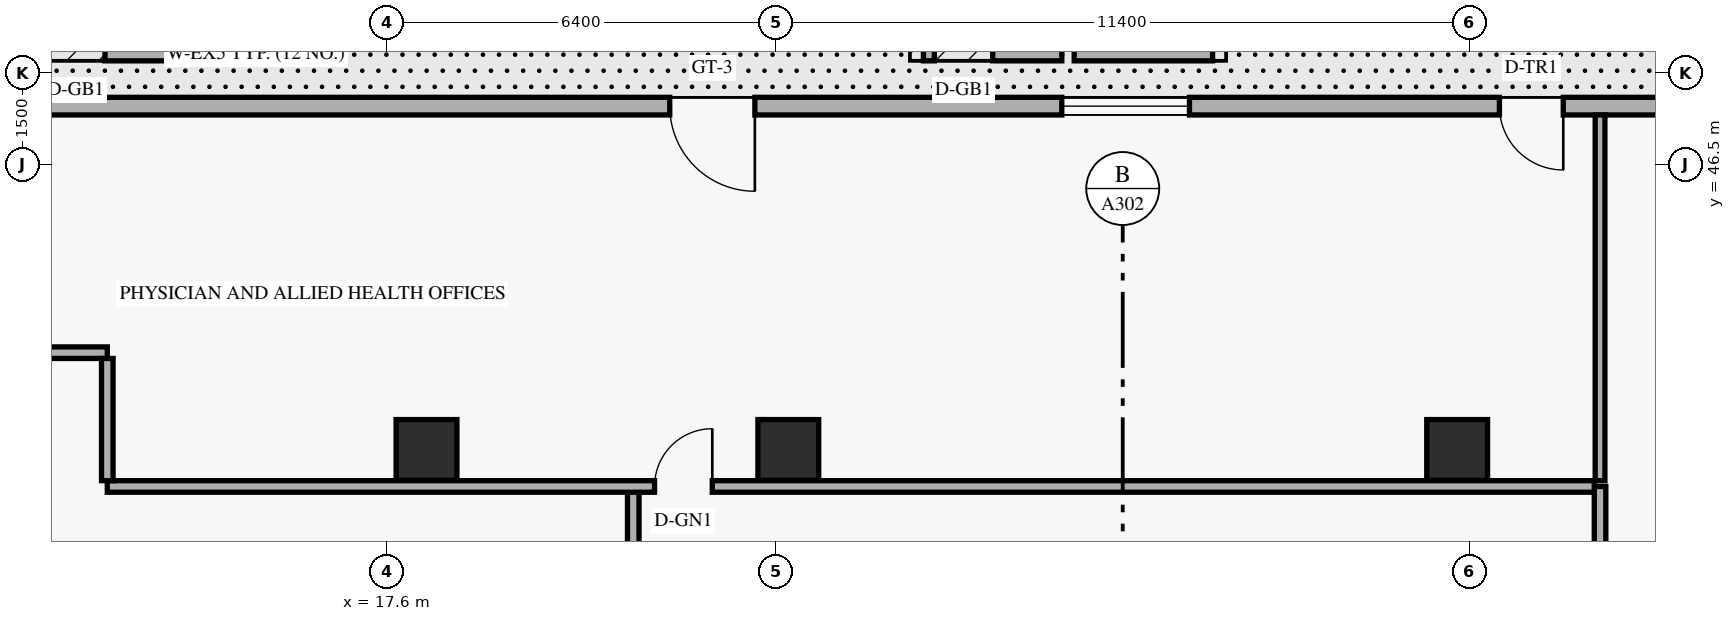
"""IFC4 building model, lengths in metres.
Left out: names, types, materials, properties, quantities, classifications, styles, units other than length and angle.
Written with IfcOpenShell. Run it as: python <this file> out.ifc"""

import sys

from ifc_helpers import new_model, si_unit, direction, frame, frame_2d, origin, origin_2d, place, context, subcontext, project, spatial, rectangle, extrude, element, fill, save


model = new_model("IFC4")
c1 = context("Model", 3, precision=1e-05, world=origin(), true_north=direction((0.0, 1.0)))
c2 = subcontext(c1, "Body", "Model", "MODEL_VIEW")
j1 = project(units=[si_unit("LENGTHUNIT", "METRE"), si_unit("PLANEANGLEUNIT", "RADIAN")], contexts=[c1])
p1 = place(None, origin())
s1 = spatial("IfcSite", under=j1, at=p1, CompositionType="ELEMENT")
p2 = place(p1, origin())
s2 = spatial("IfcBuilding", under=s1, at=p2, CompositionType="ELEMENT")
p3 = place(p2, frame((0.0, 0.0, 4.8)))
s3 = spatial("IfcBuildingStorey", under=s2, at=p3, CompositionType="ELEMENT", Elevation=4.8)
for number, where, z_axis, x_axis in (
    (1, (18.25, 41.8, 0.0), (0.0, 0.0, 1.0), (1.0, 0.0, 0.0)),
    (2, (24.2, 41.8, 0.0), (0.0, 0.0, 1.0), (1.0, 0.0, 0.0)),
    (3, (35.2, 41.8, 0.0), (0.0, 0.0, 1.0), (1.0, 0.0, 0.0)),
):
    element("IfcColumn", number, at=place(p3, frame(where, z_axis=z_axis, x_axis=x_axis)), inside=s3, PredefinedType="COLUMN", context=c2, shape_type="SweptSolid", body=[
        extrude(rectangle(XDim=1.0, YDim=1.0, at=origin_2d()), origin(), (0.0, 0.0, 1.0), 4.8),
    ])
p4 = place(p3, frame((50.78, 47.455, 0.0), z_axis=(0.0, 0.0, 1.0), x_axis=(-1.0, 0.0, 0.0)))
e4 = element("IfcWall", 4, at=p4, inside=s3, PredefinedType="SOLIDWALL", context=c2, shape_type="SweptSolid", body=[
    extrude(rectangle(XDim=46.36, YDim=0.29, at=frame_2d((23.18, 0.0))), origin(), (0.0, 0.0, 1.0), 4.52),
])
p5 = place(p4, frame((13.835, 0.0, 0.0)))
e5 = element("IfcOpeningElement", 5, at=p5, cuts=e4, PredefinedType="OPENING", context=c2, shape_type="SweptSolid", body=[
    extrude(rectangle(XDim=1.05, YDim=2.15, at=frame_2d((0.525, 1.075))), frame((0.0, 0.155, 0.0), z_axis=(0.0, -1.0, 0.0), x_axis=(1.0, 0.0, 0.0)), (0.0, 0.0, 1.0), 0.31),
])
p6 = place(p4, frame((27.13, 0.0, 0.0)))
e6 = element("IfcOpeningElement", 6, at=p6, cuts=e4, PredefinedType="OPENING", context=c2, shape_type="SweptSolid", body=[
    extrude(rectangle(XDim=1.4, YDim=2.15, at=frame_2d((0.7, 1.075))), frame((0.0, 0.155, 0.0), z_axis=(0.0, -1.0, 0.0), x_axis=(1.0, 0.0, 0.0)), (0.0, 0.0, 1.0), 0.31),
])
p7 = place(p4, frame((41.945, 0.0, 0.85)))
e7 = element("IfcOpeningElement", 7, at=p7, cuts=e4, PredefinedType="OPENING", context=c2, shape_type="SweptSolid", body=[
    extrude(rectangle(XDim=2.1, YDim=1.75, at=frame_2d((1.05, 0.875))), frame((0.0, 0.155, 0.0), z_axis=(0.0, -1.0, 0.0), x_axis=(1.0, 0.0, 0.0)), (0.0, 0.0, 1.0), 0.31),
])
p8 = place(p4, frame((19.982, 0.0, 0.85)))
e8 = element("IfcOpeningElement", 8, at=p8, cuts=e4, PredefinedType="OPENING", context=c2, shape_type="SweptSolid", body=[
    extrude(rectangle(XDim=2.1, YDim=1.75, at=frame_2d((1.05, 0.875))), frame((0.0, 0.155, 0.0), z_axis=(0.0, -1.0, 0.0), x_axis=(1.0, 0.0, 0.0)), (0.0, 0.0, 1.0), 0.31),
])
p9 = place(p4, frame((5.565, 0.0, 0.85)))
e9 = element("IfcOpeningElement", 9, at=p9, cuts=e4, PredefinedType="OPENING", context=c2, shape_type="SweptSolid", body=[
    extrude(rectangle(XDim=2.1, YDim=1.75, at=frame_2d((1.05, 0.875))), frame((0.0, 0.155, 0.0), z_axis=(0.0, -1.0, 0.0), x_axis=(1.0, 0.0, 0.0)), (0.0, 0.0, 1.0), 0.31),
])
p10 = place(p3, frame((11.822, 48.315, 0.0), z_axis=(0.0, 0.0, 1.0), x_axis=(1.0, 0.0, 0.0)))
e10 = element("IfcWall", 10, at=p10, inside=s3, PredefinedType="SOLIDWALL", context=c2, shape_type="SweptSolid", body=[
    extrude(rectangle(XDim=2.276, YDim=0.23, at=frame_2d((1.138, 0.0))), origin(), (0.0, 0.0, 1.0), 2.287),
])
p11 = place(p10, frame((0.18, 0.0, 0.0)))
e11 = element("IfcOpeningElement", 11, at=p11, cuts=e10, PredefinedType="OPENING", context=c2, shape_type="SweptSolid", body=[
    extrude(rectangle(XDim=0.96, YDim=2.08, at=frame_2d((0.48, 1.04))), frame((0.0, 0.125, 0.0), z_axis=(0.0, -1.0, 0.0), x_axis=(1.0, 0.0, 0.0)), (0.0, 0.0, 1.0), 0.25),
])
p12 = place(p3, frame((14.302, 48.315, 0.0), z_axis=(0.0, 0.0, 1.0), x_axis=(1.0, 0.0, 0.0)))
e12 = element("IfcWall", 12, at=p12, inside=s3, PredefinedType="SOLIDWALL", context=c2, shape_type="SweptSolid", body=[
    extrude(rectangle(XDim=2.276, YDim=0.23, at=frame_2d((1.138, 0.0))), origin(), (0.0, 0.0, 1.0), 2.287),
])
p13 = place(p3, frame((26.422, 48.315, 0.0), z_axis=(0.0, 0.0, 1.0), x_axis=(1.0, 0.0, 0.0)))
e13 = element("IfcWall", 13, at=p13, inside=s3, PredefinedType="SOLIDWALL", context=c2, shape_type="SweptSolid", body=[
    extrude(rectangle(XDim=2.276, YDim=0.23, at=frame_2d((1.138, 0.0))), origin(), (0.0, 0.0, 1.0), 2.287),
])
p14 = place(p13, frame((0.18, 0.0, 0.0)))
e14 = element("IfcOpeningElement", 14, at=p14, cuts=e13, PredefinedType="OPENING", context=c2, shape_type="SweptSolid", body=[
    extrude(rectangle(XDim=0.96, YDim=2.08, at=frame_2d((0.48, 1.04))), frame((0.0, 0.125, 0.0), z_axis=(0.0, -1.0, 0.0), x_axis=(1.0, 0.0, 0.0)), (0.0, 0.0, 1.0), 0.25),
])
p15 = place(p3, frame((28.902, 48.315, 0.0), z_axis=(0.0, 0.0, 1.0), x_axis=(1.0, 0.0, 0.0)))
e15 = element("IfcWall", 15, at=p15, inside=s3, PredefinedType="SOLIDWALL", context=c2, shape_type="SweptSolid", body=[
    extrude(rectangle(XDim=2.276, YDim=0.23, at=frame_2d((1.138, 0.0))), origin(), (0.0, 0.0, 1.0), 2.287),
])
p16 = place(p3, frame((21.65, 6.8, 0.0), z_axis=(0.0, 0.0, 1.0), x_axis=(0.0, 1.0, 0.0)))
e16 = element("IfcWall", 16, at=p16, inside=s3, PredefinedType="STANDARD", context=c2, shape_type="SweptSolid", body=[
    extrude(rectangle(XDim=34.4, YDim=0.19, at=frame_2d((17.2, 0.0))), origin(), (0.0, 0.0, 1.0), 3.502),
])
p17 = place(p16, frame((20.2, 0.0, 0.0)))
e17 = element("IfcOpeningElement", 17, at=p17, cuts=e16, PredefinedType="OPENING", context=c2, shape_type="SweptSolid", body=[
    extrude(rectangle(XDim=0.92, YDim=2.14, at=frame_2d((0.46, 1.07))), frame((0.0, 0.105, 0.0), z_axis=(0.0, -1.0, 0.0), x_axis=(1.0, 0.0, 0.0)), (0.0, 0.0, 1.0), 0.21),
])
p18 = place(p16, frame((28.2, 0.0, 0.0)))
e18 = element("IfcOpeningElement", 18, at=p18, cuts=e16, PredefinedType="OPENING", context=c2, shape_type="SweptSolid", body=[
    extrude(rectangle(XDim=0.95, YDim=2.15, at=frame_2d((0.475, 1.075))), frame((0.0, 0.105, 0.0), z_axis=(0.0, -1.0, 0.0), x_axis=(1.0, 0.0, 0.0)), (0.0, 0.0, 1.0), 0.21),
])
p19 = place(p16, frame((6.0, 0.0, 0.0)))
e19 = element("IfcOpeningElement", 19, at=p19, cuts=e16, PredefinedType="OPENING", context=c2, shape_type="SweptSolid", body=[
    extrude(rectangle(XDim=0.9, YDim=2.1, at=frame_2d((0.45, 1.05))), frame((0.0, 0.105, 0.0), z_axis=(0.0, -1.0, 0.0), x_axis=(1.0, 0.0, 0.0)), (0.0, 0.0, 1.0), 0.21),
])
p20 = place(p3, frame((37.55, 6.8, 0.0), z_axis=(0.0, 0.0, 1.0), x_axis=(0.0, 1.0, 0.0)))
e20 = element("IfcWall", 20, at=p20, inside=s3, PredefinedType="STANDARD", context=c2, shape_type="SweptSolid", body=[
    extrude(rectangle(XDim=34.4, YDim=0.19, at=frame_2d((17.2, 0.0))), origin(), (0.0, 0.0, 1.0), 3.502),
])
p21 = place(p20, frame((3.0, 0.0, 0.0)))
e21 = element("IfcOpeningElement", 21, at=p21, cuts=e20, PredefinedType="OPENING", context=c2, shape_type="SweptSolid", body=[
    extrude(rectangle(XDim=1.05, YDim=2.15, at=frame_2d((0.525, 1.075))), frame((0.0, 0.105, 0.0), z_axis=(0.0, -1.0, 0.0), x_axis=(1.0, 0.0, 0.0)), (0.0, 0.0, 1.0), 0.21),
])
p22 = place(p20, frame((15.2, 0.0, 0.0)))
e22 = element("IfcOpeningElement", 22, at=p22, cuts=e20, PredefinedType="OPENING", context=c2, shape_type="SweptSolid", body=[
    extrude(rectangle(XDim=1.2, YDim=2.15, at=frame_2d((0.6, 1.075))), frame((0.0, 0.105, 0.0), z_axis=(0.0, -1.0, 0.0), x_axis=(1.0, 0.0, 0.0)), (0.0, 0.0, 1.0), 0.21),
])
p23 = place(p20, frame((26.8, 0.0, 0.0)))
e23 = element("IfcOpeningElement", 23, at=p23, cuts=e20, PredefinedType="OPENING", context=c2, shape_type="SweptSolid", body=[
    extrude(rectangle(XDim=1.05, YDim=2.15, at=frame_2d((0.525, 1.075))), frame((0.0, 0.105, 0.0), z_axis=(0.0, -1.0, 0.0), x_axis=(1.0, 0.0, 0.0)), (0.0, 0.0, 1.0), 0.21),
])
p24 = place(p3, frame((13.0, 41.2, 0.0), z_axis=(0.0, 0.0, 1.0), x_axis=(1.0, 0.0, 0.0)))
e24 = element("IfcWall", 24, at=p24, inside=s3, PredefinedType="STANDARD", context=c2, shape_type="SweptSolid", body=[
    extrude(rectangle(XDim=24.455, YDim=0.19, at=frame_2d((12.228, 0.0))), origin(), (0.0, 0.0, 1.0), 3.732),
])
p25 = place(p24, frame((9.0, 0.0, 0.0)))
e25 = element("IfcOpeningElement", 25, at=p25, cuts=e24, PredefinedType="OPENING", context=c2, shape_type="SweptSolid", body=[
    extrude(rectangle(XDim=0.95, YDim=2.15, at=frame_2d((0.475, 1.075))), frame((0.0, 0.105, 0.0), z_axis=(0.0, -1.0, 0.0), x_axis=(1.0, 0.0, 0.0)), (0.0, 0.0, 1.0), 0.21),
])
p26 = place(p3, frame((11.15, 43.4, 0.0), z_axis=(0.0, 0.0, 1.0), x_axis=(1.0, 0.0, 0.0)))
e26 = element("IfcWall", 26, at=p26, inside=s3, PredefinedType="STANDARD", context=c2, shape_type="SweptSolid", body=[
    extrude(rectangle(XDim=1.85, YDim=0.19, at=frame_2d((0.925, 0.0))), origin(), (0.0, 0.0, 1.0), 4.52),
])
p27 = place(p3, frame((13.0, 41.295, 0.0), z_axis=(0.0, 0.0, 1.0), x_axis=(0.0, 1.0, 0.0)))
e27 = element("IfcWall", 27, at=p27, inside=s3, PredefinedType="STANDARD", context=c2, shape_type="SweptSolid", body=[
    extrude(rectangle(XDim=2.01, YDim=0.19, at=frame_2d((1.005, 0.0))), origin(), (0.0, 0.0, 1.0), 3.969),
])
p28 = place(p3, frame((37.55, 41.295, 0.0), z_axis=(0.0, 0.0, 1.0), x_axis=(0.0, 1.0, 0.0)))
e28 = element("IfcWall", 28, at=p28, inside=s3, PredefinedType="PARTITIONING", context=c2, shape_type="SweptSolid", body=[
    extrude(rectangle(XDim=6.015, YDim=0.16, at=frame_2d((3.008, 0.0))), origin(), (0.0, 0.0, 1.0), 3.969),
])
p29 = place(p5, origin())
e29 = element("IfcDoor", 29, at=p29, inside=s3, OperationType="SINGLE_SWING_LEFT", PredefinedType="DOOR", context=c2, shape_type="SweptSolid", body=[
    extrude(rectangle(XDim=1.05, YDim=2.15, at=frame_2d((0.525, 1.075))), frame((0.0, 0.025, 0.0), z_axis=(0.0, -1.0, 0.0), x_axis=(1.0, 0.0, 0.0)), (0.0, 0.0, 1.0), 0.05),
])
fill(e5, e29)
p30 = place(p6, origin())
e30 = element("IfcDoor", 30, at=p30, inside=s3, OperationType="SINGLE_SWING_LEFT", PredefinedType="GATE", context=c2, shape_type="SweptSolid", body=[
    extrude(rectangle(XDim=1.4, YDim=2.15, at=frame_2d((0.7, 1.075))), frame((0.0, 0.025, 0.0), z_axis=(0.0, -1.0, 0.0), x_axis=(1.0, 0.0, 0.0)), (0.0, 0.0, 1.0), 0.05),
])
fill(e6, e30)
p31 = place(p8, origin())
e31 = element("IfcWindow", 31, at=p31, inside=s3, PartitioningType="SINGLE_PANEL", PredefinedType="WINDOW", context=c2, shape_type="SweptSolid", body=[
    extrude(rectangle(XDim=2.1, YDim=1.75, at=frame_2d((1.05, 0.875))), frame((0.0, 0.03, 0.0), z_axis=(0.0, -1.0, 0.0), x_axis=(1.0, 0.0, 0.0)), (0.0, 0.0, 1.0), 0.06),
])
fill(e8, e31)
p32 = place(p11, origin())
e32 = element("IfcDoor", 32, at=p32, inside=s3, OperationType="SINGLE_SWING_LEFT", PredefinedType="DOOR", context=c2, shape_type="SweptSolid", body=[
    extrude(rectangle(XDim=0.96, YDim=2.08, at=frame_2d((0.48, 1.04))), frame((0.0, 0.025, 0.0), z_axis=(0.0, -1.0, 0.0), x_axis=(1.0, 0.0, 0.0)), (0.0, 0.0, 1.0), 0.05),
])
fill(e11, e32)
p33 = place(p14, origin())
e33 = element("IfcDoor", 33, at=p33, inside=s3, OperationType="SINGLE_SWING_LEFT", PredefinedType="DOOR", context=c2, shape_type="SweptSolid", body=[
    extrude(rectangle(XDim=0.96, YDim=2.08, at=frame_2d((0.48, 1.04))), frame((0.0, 0.025, 0.0), z_axis=(0.0, -1.0, 0.0), x_axis=(1.0, 0.0, 0.0)), (0.0, 0.0, 1.0), 0.05),
])
fill(e14, e33)
p34 = place(p25, origin())
e34 = element("IfcDoor", 34, at=p34, inside=s3, OperationType="SINGLE_SWING_RIGHT", PredefinedType="DOOR", context=c2, shape_type="SweptSolid", body=[
    extrude(rectangle(XDim=0.95, YDim=2.15, at=frame_2d((0.475, 1.075))), frame((0.0, 0.025, 0.0), z_axis=(0.0, -1.0, 0.0), x_axis=(1.0, 0.0, 0.0)), (0.0, 0.0, 1.0), 0.05),
])
fill(e25, e34)
save(model, sys.argv[1])
